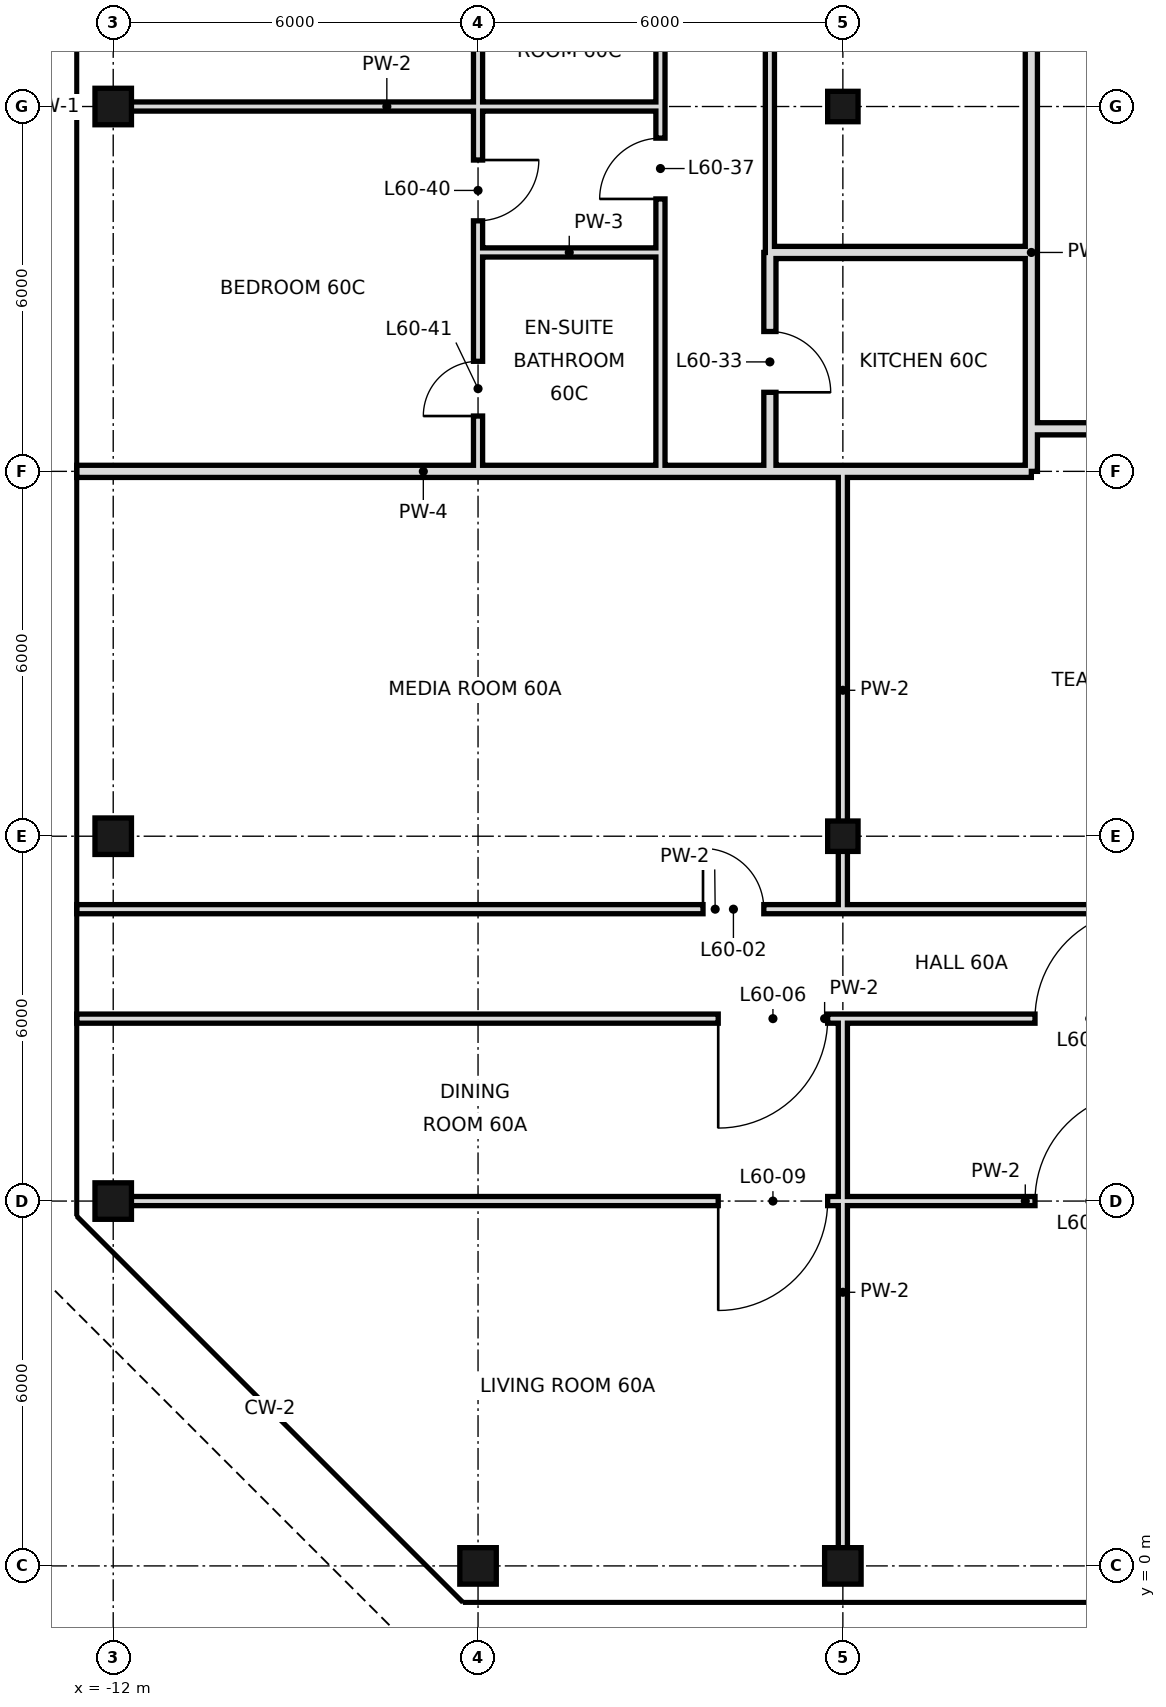
"""IFC4 building model, lengths in metres.
Left out: names, types, materials, properties, quantities, classifications, styles, units other than length and angle.
Written with IfcOpenShell. Run it as: python <this file> out.ifc"""

import sys

from ifc_helpers import new_model, si_unit, direction, frame, frame_2d, origin, origin_2d, place, context, subcontext, project, spatial, rectangle, hollow_rectangle, extrude, element, fill, save


model = new_model("IFC4")
c1 = context("Model", 3, precision=1e-05, world=origin(), true_north=direction((0.0, 1.0)))
c2 = subcontext(c1, "Body", "Model", "MODEL_VIEW")
j1 = project(units=[si_unit("LENGTHUNIT", "METRE"), si_unit("PLANEANGLEUNIT", "RADIAN")], contexts=[c1])
p1 = place(None, origin())
s1 = spatial("IfcSite", under=j1, at=p1, CompositionType="ELEMENT")
p2 = place(p1, origin())
s2 = spatial("IfcBuilding", under=s1, at=p2, CompositionType="ELEMENT")
p3 = place(p2, frame((0.0, 0.0, 254.0)))
s3 = spatial("IfcBuildingStorey", under=s2, at=p3, CompositionType="ELEMENT", Elevation=254.0)
for number, where, z_axis, x_axis in (
    (1, (-12.0, 6.0, 0.0), (0.0, 0.0, 1.0), (1.0, 0.0, 0.0)),
    (2, (-12.0, 12.0, 0.0), (0.0, 0.0, 1.0), (1.0, 0.0, 0.0)),
    (3, (-12.0, 24.0, 0.0), (0.0, 0.0, 1.0), (1.0, 0.0, 0.0)),
    (4, (-6.0, 0.0, 0.0), (0.0, 0.0, 1.0), (1.0, 0.0, 0.0)),
    (5, (0.0, 0.0, 0.0), (0.0, 0.0, 1.0), (1.0, 0.0, 0.0)),
):
    element("IfcColumn", number, at=place(p3, frame(where, z_axis=z_axis, x_axis=x_axis)), inside=s3, PredefinedType="COLUMN", context=c2, shape_type="SweptSolid", body=[
        extrude(hollow_rectangle(XDim=0.6, YDim=0.6, WallThickness=0.028, at=origin_2d()), origin(), (0.0, 0.0, 1.0), 3.6),
    ])
for number, where, z_axis, x_axis in (
    (6, (0.0, 12.0, 0.0), (0.0, 0.0, 1.0), (1.0, 0.0, 0.0)),
    (7, (0.0, 24.0, 0.0), (0.0, 0.0, 1.0), (1.0, 0.0, 0.0)),
):
    element("IfcColumn", number, at=place(p3, frame(where, z_axis=z_axis, x_axis=x_axis)), inside=s3, PredefinedType="COLUMN", context=c2, shape_type="SweptSolid", body=[
        extrude(hollow_rectangle(XDim=0.5, YDim=0.5, WallThickness=0.025, at=origin_2d()), origin(), (0.0, 0.0, 1.0), 3.6),
    ])
p4 = place(p3, frame((-1.2, 18.0, 0.0), z_axis=(0.0, 0.0, 1.0), x_axis=(0.0, 1.0, 0.0)))
e8 = element("IfcWall", 8, at=p4, inside=s3, PredefinedType="SOLIDWALL", context=c2, shape_type="SweptSolid", body=[
    extrude(rectangle(XDim=3.6, YDim=0.2, at=frame_2d((1.8, 0.0))), origin(), (0.0, 0.0, 1.0), 2.68),
])
p5 = place(p4, frame((1.3, 0.0, 0.0)))
e9 = element("IfcOpeningElement", 9, at=p5, cuts=e8, PredefinedType="OPENING", context=c2, shape_type="SweptSolid", body=[
    extrude(rectangle(XDim=1.0, YDim=2.4, at=frame_2d((0.5, 1.2))), frame((0.0, 0.11, 0.0), z_axis=(0.0, -1.0, 0.0), x_axis=(1.0, 0.0, 0.0)), (0.0, 0.0, 1.0), 0.22),
])
p6 = place(p3, frame((-1.2, 21.6, 0.0), z_axis=(0.0, 0.0, 1.0), x_axis=(0.0, 1.0, 0.0)))
e10 = element("IfcWall", 10, at=p6, inside=s3, PredefinedType="PARTITIONING", context=c2, shape_type="SweptSolid", body=[
    extrude(rectangle(XDim=15.6, YDim=0.15, at=frame_2d((7.8, 0.0))), origin(), (0.0, 0.0, 1.0), 3.38),
])
p7 = place(p6, frame((12.7, 0.0, 0.0)))
e11 = element("IfcOpeningElement", 11, at=p7, cuts=e10, PredefinedType="OPENING", context=c2, shape_type="SweptSolid", body=[
    extrude(rectangle(XDim=1.0, YDim=2.4, at=frame_2d((0.5, 1.2))), frame((0.0, 0.085, 0.0), z_axis=(0.0, -1.0, 0.0), x_axis=(1.0, 0.0, 0.0)), (0.0, 0.0, 1.0), 0.17),
])
p8 = place(p6, frame((4.9, 0.0, 0.0)))
e12 = element("IfcOpeningElement", 12, at=p8, cuts=e10, PredefinedType="OPENING", context=c2, shape_type="SweptSolid", body=[
    extrude(rectangle(XDim=1.0, YDim=2.4, at=frame_2d((0.5, 1.2))), frame((0.0, 0.085, 0.0), z_axis=(0.0, -1.0, 0.0), x_axis=(1.0, 0.0, 0.0)), (0.0, 0.0, 1.0), 0.17),
])
p9 = place(p3, frame((-3.0, 21.6, 0.0), z_axis=(0.0, 0.0, 1.0), x_axis=(0.0, 1.0, 0.0)))
e13 = element("IfcWall", 13, at=p9, inside=s3, PredefinedType="PARTITIONING", context=c2, shape_type="SweptSolid", body=[
    extrude(rectangle(XDim=18.0, YDim=0.15, at=frame_2d((9.0, 0.0))), origin(), (0.0, 0.0, 1.0), 3.38),
])
p10 = place(p9, frame((0.88, 0.0, 0.0)))
e14 = element("IfcOpeningElement", 14, at=p10, cuts=e13, PredefinedType="OPENING", context=c2, shape_type="SweptSolid", body=[
    extrude(rectangle(XDim=1.0, YDim=2.4, at=frame_2d((0.5, 1.2))), frame((0.0, 0.085, 0.0), z_axis=(0.0, -1.0, 0.0), x_axis=(1.0, 0.0, 0.0)), (0.0, 0.0, 1.0), 0.17),
])
p11 = place(p9, frame((9.44, 0.0, 0.0)))
e15 = element("IfcOpeningElement", 15, at=p11, cuts=e13, PredefinedType="OPENING", context=c2, shape_type="SweptSolid", body=[
    extrude(rectangle(XDim=1.8, YDim=2.4, at=frame_2d((0.9, 1.2))), frame((0.0, 0.085, 0.0), z_axis=(0.0, -1.0, 0.0), x_axis=(1.0, 0.0, 0.0)), (0.0, 0.0, 1.0), 0.17),
])
p12 = place(p9, frame((15.7, 0.0, 0.0)))
e16 = element("IfcOpeningElement", 16, at=p12, cuts=e13, PredefinedType="OPENING", context=c2, shape_type="SweptSolid", body=[
    extrude(rectangle(XDim=1.0, YDim=2.4, at=frame_2d((0.5, 1.2))), frame((0.0, 0.085, 0.0), z_axis=(0.0, -1.0, 0.0), x_axis=(1.0, 0.0, 0.0)), (0.0, 0.0, 1.0), 0.17),
])
p13 = place(p3, frame((-3.0, 18.0, 0.0), z_axis=(0.0, 0.0, 1.0), x_axis=(0.0, 1.0, 0.0)))
e17 = element("IfcWall", 17, at=p13, inside=s3, PredefinedType="PARTITIONING", context=c2, shape_type="SweptSolid", body=[
    extrude(rectangle(XDim=3.6, YDim=0.15, at=frame_2d((1.8, 0.0))), origin(), (0.0, 0.0, 1.0), 3.38),
])
p14 = place(p3, frame((-6.0, 21.6, 0.0), z_axis=(0.0, 0.0, 1.0), x_axis=(0.0, 1.0, 0.0)))
e18 = element("IfcWall", 18, at=p14, inside=s3, PredefinedType="PARTITIONING", context=c2, shape_type="SweptSolid", body=[
    extrude(rectangle(XDim=18.0, YDim=0.15, at=frame_2d((9.0, 0.0))), origin(), (0.0, 0.0, 1.0), 3.38),
])
p15 = place(p14, frame((0.52, 0.0, 0.0)))
e19 = element("IfcOpeningElement", 19, at=p15, cuts=e18, PredefinedType="OPENING", context=c2, shape_type="SweptSolid", body=[
    extrude(rectangle(XDim=1.0, YDim=2.4, at=frame_2d((0.5, 1.2))), frame((0.0, 0.085, 0.0), z_axis=(0.0, -1.0, 0.0), x_axis=(1.0, 0.0, 0.0)), (0.0, 0.0, 1.0), 0.17),
])
p16 = place(p14, frame((7.5, 0.0, 0.0)))
e20 = element("IfcOpeningElement", 20, at=p16, cuts=e18, PredefinedType="OPENING", context=c2, shape_type="SweptSolid", body=[
    extrude(rectangle(XDim=1.8, YDim=2.4, at=frame_2d((0.9, 1.2))), frame((0.0, 0.085, 0.0), z_axis=(0.0, -1.0, 0.0), x_axis=(1.0, 0.0, 0.0)), (0.0, 0.0, 1.0), 0.17),
])
p17 = place(p14, frame((16.12, 0.0, 0.0)))
e21 = element("IfcOpeningElement", 21, at=p17, cuts=e18, PredefinedType="OPENING", context=c2, shape_type="SweptSolid", body=[
    extrude(rectangle(XDim=1.0, YDim=2.4, at=frame_2d((0.5, 1.2))), frame((0.0, 0.085, 0.0), z_axis=(0.0, -1.0, 0.0), x_axis=(1.0, 0.0, 0.0)), (0.0, 0.0, 1.0), 0.17),
])
p18 = place(p3, frame((-6.0, 18.0, 0.0), z_axis=(0.0, 0.0, 1.0), x_axis=(0.0, 1.0, 0.0)))
e22 = element("IfcWall", 22, at=p18, inside=s3, PredefinedType="PARTITIONING", context=c2, shape_type="SweptSolid", body=[
    extrude(rectangle(XDim=3.6, YDim=0.15, at=frame_2d((1.8, 0.0))), origin(), (0.0, 0.0, 1.0), 3.38),
])
p19 = place(p18, frame((0.91, 0.0, 0.0)))
e23 = element("IfcOpeningElement", 23, at=p19, cuts=e22, PredefinedType="OPENING", context=c2, shape_type="SweptSolid", body=[
    extrude(rectangle(XDim=0.9, YDim=2.4, at=frame_2d((0.45, 1.2))), frame((0.0, 0.085, 0.0), z_axis=(0.0, -1.0, 0.0), x_axis=(1.0, 0.0, 0.0)), (0.0, 0.0, 1.0), 0.17),
])
p20 = place(p3, frame((0.0, 0.0, 0.0), z_axis=(0.0, 0.0, 1.0), x_axis=(0.0, 1.0, 0.0)))
e24 = element("IfcWall", 24, at=p20, inside=s3, PredefinedType="PARTITIONING", context=c2, shape_type="SweptSolid", body=[
    extrude(rectangle(XDim=9.0, YDim=0.15, at=frame_2d((4.5, 0.0))), origin(), (0.0, 0.0, 1.0), 2.68),
])
p21 = place(p3, frame((0.0, 10.8, 0.0), z_axis=(0.0, 0.0, 1.0), x_axis=(0.0, 1.0, 0.0)))
e25 = element("IfcWall", 25, at=p21, inside=s3, PredefinedType="PARTITIONING", context=c2, shape_type="SweptSolid", body=[
    extrude(rectangle(XDim=7.2, YDim=0.15, at=frame_2d((3.6, 0.0))), origin(), (0.0, 0.0, 1.0), 2.68),
])
p22 = place(p3, frame((3.1, 21.6, 0.0), z_axis=(0.0, 0.0, 1.0), x_axis=(0.0, 1.0, 0.0)))
e26 = element("IfcWall", 26, at=p22, inside=s3, PredefinedType="SOLIDWALL", context=c2, shape_type="SweptSolid", body=[
    extrude(rectangle(XDim=27.0, YDim=0.2, at=frame_2d((13.5, 0.0))), origin(), (0.0, 0.0, 1.0), 2.68),
])
p23 = place(p22, frame((12.6, 0.0, 0.0)))
e27 = element("IfcOpeningElement", 27, at=p23, cuts=e26, PredefinedType="OPENING", context=c2, shape_type="SweptSolid", body=[
    extrude(rectangle(XDim=1.2, YDim=2.4, at=frame_2d((0.6, 1.2))), frame((0.0, 0.11, 0.0), z_axis=(0.0, -1.0, 0.0), x_axis=(1.0, 0.0, 0.0)), (0.0, 0.0, 1.0), 0.22),
])
p24 = place(p3, frame((3.1, 18.0, 0.0), z_axis=(0.0, 0.0, 1.0), x_axis=(0.0, 1.0, 0.0)))
e28 = element("IfcWall", 28, at=p24, inside=s3, PredefinedType="SOLIDWALL", context=c2, shape_type="SweptSolid", body=[
    extrude(rectangle(XDim=3.6, YDim=0.2, at=frame_2d((1.8, 0.0))), origin(), (0.0, 0.0, 1.0), 2.93),
])
p25 = place(p3, frame((-12.6, 10.8, 0.0), z_axis=(0.0, 0.0, 1.0), x_axis=(1.0, 0.0, 0.0)))
e29 = element("IfcWall", 29, at=p25, inside=s3, PredefinedType="PARTITIONING", context=c2, shape_type="SweptSolid", body=[
    extrude(rectangle(XDim=21.0, YDim=0.15, at=frame_2d((10.5, 0.0))), origin(), (0.0, 0.0, 1.0), 3.38),
])
p26 = place(p25, frame((10.3, 0.0, 0.0)))
e30 = element("IfcOpeningElement", 30, at=p26, cuts=e29, PredefinedType="OPENING", context=c2, shape_type="SweptSolid", body=[
    extrude(rectangle(XDim=1.0, YDim=2.4, at=frame_2d((0.5, 1.2))), frame((0.0, 0.085, 0.0), z_axis=(0.0, -1.0, 0.0), x_axis=(1.0, 0.0, 0.0)), (0.0, 0.0, 1.0), 0.17),
])
p27 = place(p25, frame((17.68, 0.0, 0.0)))
e31 = element("IfcOpeningElement", 31, at=p27, cuts=e29, PredefinedType="OPENING", context=c2, shape_type="SweptSolid", body=[
    extrude(rectangle(XDim=1.0, YDim=2.4, at=frame_2d((0.5, 1.2))), frame((0.0, 0.085, 0.0), z_axis=(0.0, -1.0, 0.0), x_axis=(1.0, 0.0, 0.0)), (0.0, 0.0, 1.0), 0.17),
])
p28 = place(p3, frame((-1.2, 18.0, 0.0), z_axis=(0.0, 0.0, 1.0), x_axis=(1.0, 0.0, 0.0)))
e32 = element("IfcWall", 32, at=p28, inside=s3, PredefinedType="SOLIDWALL", context=c2, shape_type="SweptSolid", body=[
    extrude(rectangle(XDim=4.3, YDim=0.2, at=frame_2d((2.15, 0.0))), origin(), (0.0, 0.0, 1.0), 2.68),
])
p29 = place(p3, frame((-12.6, 18.0, 0.0), z_axis=(0.0, 0.0, 1.0), x_axis=(1.0, 0.0, 0.0)))
e33 = element("IfcWall", 33, at=p29, inside=s3, PredefinedType="SOLIDWALL", context=c2, shape_type="SweptSolid", body=[
    extrude(rectangle(XDim=11.4, YDim=0.2, at=frame_2d((5.7, 0.0))), origin(), (0.0, 0.0, 1.0), 2.68),
])
p30 = place(p3, frame((3.1, 18.7, 0.0), z_axis=(0.0, 0.0, 1.0), x_axis=(1.0, 0.0, 0.0)))
e34 = element("IfcWall", 34, at=p30, inside=s3, PredefinedType="SOLIDWALL", context=c2, shape_type="SweptSolid", body=[
    extrude(rectangle(XDim=5.3, YDim=0.2, at=frame_2d((2.65, 0.0))), origin(), (0.0, 0.0, 1.0), 2.68),
])
p31 = place(p3, frame((-1.2, 21.6, 0.0), z_axis=(0.0, 0.0, 1.0), x_axis=(1.0, 0.0, 0.0)))
e35 = element("IfcWall", 35, at=p31, inside=s3, PredefinedType="SOLIDWALL", context=c2, shape_type="SweptSolid", body=[
    extrude(rectangle(XDim=4.3, YDim=0.2, at=frame_2d((2.15, 0.0))), origin(), (0.0, 0.0, 1.0), 2.68),
])
p32 = place(p3, frame((-6.0, 21.6, 0.0), z_axis=(0.0, 0.0, 1.0), x_axis=(1.0, 0.0, 0.0)))
e36 = element("IfcWall", 36, at=p32, inside=s3, PredefinedType="PARTITIONING", context=c2, shape_type="SweptSolid", body=[
    extrude(rectangle(XDim=3.0, YDim=0.15, at=frame_2d((1.5, 0.0))), origin(), (0.0, 0.0, 1.0), 3.38),
])
p33 = place(p3, frame((-12.0, 24.0, 0.0), z_axis=(0.0, 0.0, 1.0), x_axis=(1.0, 0.0, 0.0)))
e37 = element("IfcWall", 37, at=p33, inside=s3, PredefinedType="PARTITIONING", context=c2, shape_type="SweptSolid", body=[
    extrude(rectangle(XDim=9.0, YDim=0.15, at=frame_2d((4.5, 0.0))), origin(), (0.0, 0.0, 1.0), 2.68),
])
p34 = place(p3, frame((-12.0, 6.0, 0.0), z_axis=(0.0, 0.0, 1.0), x_axis=(1.0, 0.0, 0.0)))
e38 = element("IfcWall", 38, at=p34, inside=s3, PredefinedType="PARTITIONING", context=c2, shape_type="SweptSolid", body=[
    extrude(rectangle(XDim=24.0, YDim=0.15, at=frame_2d((12.0, 0.0))), origin(), (0.0, 0.0, 1.0), 2.68),
])
p35 = place(p34, frame((9.95, 0.0, 0.0)))
e39 = element("IfcOpeningElement", 39, at=p35, cuts=e38, PredefinedType="OPENING", context=c2, shape_type="SweptSolid", body=[
    extrude(rectangle(XDim=1.8, YDim=2.4, at=frame_2d((0.9, 1.2))), frame((0.0, 0.085, 0.0), z_axis=(0.0, -1.0, 0.0), x_axis=(1.0, 0.0, 0.0)), (0.0, 0.0, 1.0), 0.17),
])
p36 = place(p34, frame((15.16, 0.0, 0.0)))
e40 = element("IfcOpeningElement", 40, at=p36, cuts=e38, PredefinedType="OPENING", context=c2, shape_type="SweptSolid", body=[
    extrude(rectangle(XDim=1.8, YDim=2.4, at=frame_2d((0.9, 1.2))), frame((0.0, 0.085, 0.0), z_axis=(0.0, -1.0, 0.0), x_axis=(1.0, 0.0, 0.0)), (0.0, 0.0, 1.0), 0.17),
])
p37 = place(p3, frame((-12.6, 9.0, 0.0), z_axis=(0.0, 0.0, 1.0), x_axis=(1.0, 0.0, 0.0)))
e41 = element("IfcWall", 41, at=p37, inside=s3, PredefinedType="PARTITIONING", context=c2, shape_type="SweptSolid", body=[
    extrude(rectangle(XDim=24.6, YDim=0.15, at=frame_2d((12.3, 0.0))), origin(), (0.0, 0.0, 1.0), 3.38),
])
p38 = place(p37, frame((10.55, 0.0, 0.0)))
e42 = element("IfcOpeningElement", 42, at=p38, cuts=e41, PredefinedType="OPENING", context=c2, shape_type="SweptSolid", body=[
    extrude(rectangle(XDim=1.8, YDim=2.4, at=frame_2d((0.9, 1.2))), frame((0.0, 0.085, 0.0), z_axis=(0.0, -1.0, 0.0), x_axis=(1.0, 0.0, 0.0)), (0.0, 0.0, 1.0), 0.17),
])
p39 = place(p37, frame((15.76, 0.0, 0.0)))
e43 = element("IfcOpeningElement", 43, at=p39, cuts=e41, PredefinedType="OPENING", context=c2, shape_type="SweptSolid", body=[
    extrude(rectangle(XDim=1.8, YDim=2.4, at=frame_2d((0.9, 1.2))), frame((0.0, 0.085, 0.0), z_axis=(0.0, -1.0, 0.0), x_axis=(1.0, 0.0, 0.0)), (0.0, 0.0, 1.0), 0.17),
])
p40 = place(p26, origin())
e44 = element("IfcDoor", 44, at=p40, inside=s3, OperationType="SINGLE_SWING_LEFT", PredefinedType="DOOR", context=c2, shape_type="SweptSolid", body=[
    extrude(rectangle(XDim=1.0, YDim=2.4, at=frame_2d((0.5, 1.2))), frame((0.0, 0.025, 0.0), z_axis=(0.0, -1.0, 0.0), x_axis=(1.0, 0.0, 0.0)), (0.0, 0.0, 1.0), 0.05),
])
fill(e30, e44)
p41 = place(p38, frame((1.8, 0.0, 0.0), z_axis=(0.0, 0.0, 1.0), x_axis=(-1.0, 0.0, 0.0)))
e45 = element("IfcDoor", 45, at=p41, inside=s3, OperationType="SINGLE_SWING_RIGHT", PredefinedType="DOOR", context=c2, shape_type="SweptSolid", body=[
    extrude(rectangle(XDim=1.8, YDim=2.4, at=frame_2d((0.9, 1.2))), frame((0.0, 0.025, 0.0), z_axis=(0.0, -1.0, 0.0), x_axis=(1.0, 0.0, 0.0)), (0.0, 0.0, 1.0), 0.05),
])
fill(e42, e45)
p42 = place(p39, frame((1.8, 0.0, 0.0), z_axis=(0.0, 0.0, 1.0), x_axis=(-1.0, 0.0, 0.0)))
e46 = element("IfcDoor", 46, at=p42, inside=s3, OperationType="SINGLE_SWING_LEFT", PredefinedType="DOOR", context=c2, shape_type="SweptSolid", body=[
    extrude(rectangle(XDim=1.8, YDim=2.4, at=frame_2d((0.9, 1.2))), frame((0.0, 0.025, 0.0), z_axis=(0.0, -1.0, 0.0), x_axis=(1.0, 0.0, 0.0)), (0.0, 0.0, 1.0), 0.05),
])
fill(e43, e46)
p43 = place(p35, frame((1.8, 0.0, 0.0), z_axis=(0.0, 0.0, 1.0), x_axis=(-1.0, 0.0, 0.0)))
e47 = element("IfcDoor", 47, at=p43, inside=s3, OperationType="SINGLE_SWING_RIGHT", PredefinedType="DOOR", context=c2, shape_type="SweptSolid", body=[
    extrude(rectangle(XDim=1.8, YDim=2.4, at=frame_2d((0.9, 1.2))), frame((0.0, 0.025, 0.0), z_axis=(0.0, -1.0, 0.0), x_axis=(1.0, 0.0, 0.0)), (0.0, 0.0, 1.0), 0.05),
])
fill(e39, e47)
p44 = place(p36, frame((1.8, 0.0, 0.0), z_axis=(0.0, 0.0, 1.0), x_axis=(-1.0, 0.0, 0.0)))
e48 = element("IfcDoor", 48, at=p44, inside=s3, OperationType="SINGLE_SWING_LEFT", PredefinedType="DOOR", context=c2, shape_type="SweptSolid", body=[
    extrude(rectangle(XDim=1.8, YDim=2.4, at=frame_2d((0.9, 1.2))), frame((0.0, 0.025, 0.0), z_axis=(0.0, -1.0, 0.0), x_axis=(1.0, 0.0, 0.0)), (0.0, 0.0, 1.0), 0.05),
])
fill(e40, e48)
p45 = place(p5, frame((1.0, 0.0, 0.0), z_axis=(0.0, 0.0, 1.0), x_axis=(-1.0, 0.0, 0.0)))
e49 = element("IfcDoor", 49, at=p45, inside=s3, OperationType="SINGLE_SWING_RIGHT", PredefinedType="DOOR", context=c2, shape_type="SweptSolid", body=[
    extrude(rectangle(XDim=1.0, YDim=2.4, at=frame_2d((0.5, 1.2))), frame((0.0, 0.025, 0.0), z_axis=(0.0, -1.0, 0.0), x_axis=(1.0, 0.0, 0.0)), (0.0, 0.0, 1.0), 0.05),
])
fill(e9, e49)
p46 = place(p10, origin())
e50 = element("IfcDoor", 50, at=p46, inside=s3, OperationType="SINGLE_SWING_LEFT", PredefinedType="DOOR", context=c2, shape_type="SweptSolid", body=[
    extrude(rectangle(XDim=1.0, YDim=2.4, at=frame_2d((0.5, 1.2))), frame((0.0, 0.025, 0.0), z_axis=(0.0, -1.0, 0.0), x_axis=(1.0, 0.0, 0.0)), (0.0, 0.0, 1.0), 0.05),
])
fill(e14, e50)
p47 = place(p15, origin())
e51 = element("IfcDoor", 51, at=p47, inside=s3, OperationType="SINGLE_SWING_RIGHT", PredefinedType="DOOR", context=c2, shape_type="SweptSolid", body=[
    extrude(rectangle(XDim=1.0, YDim=2.4, at=frame_2d((0.5, 1.2))), frame((0.0, 0.025, 0.0), z_axis=(0.0, -1.0, 0.0), x_axis=(1.0, 0.0, 0.0)), (0.0, 0.0, 1.0), 0.05),
])
fill(e19, e51)
p48 = place(p19, origin())
e52 = element("IfcDoor", 52, at=p48, inside=s3, OperationType="SINGLE_SWING_LEFT", PredefinedType="DOOR", context=c2, shape_type="SweptSolid", body=[
    extrude(rectangle(XDim=0.9, YDim=2.4, at=frame_2d((0.45, 1.2))), frame((0.0, 0.025, 0.0), z_axis=(0.0, -1.0, 0.0), x_axis=(1.0, 0.0, 0.0)), (0.0, 0.0, 1.0), 0.05),
])
fill(e23, e52)
save(model, sys.argv[1])
